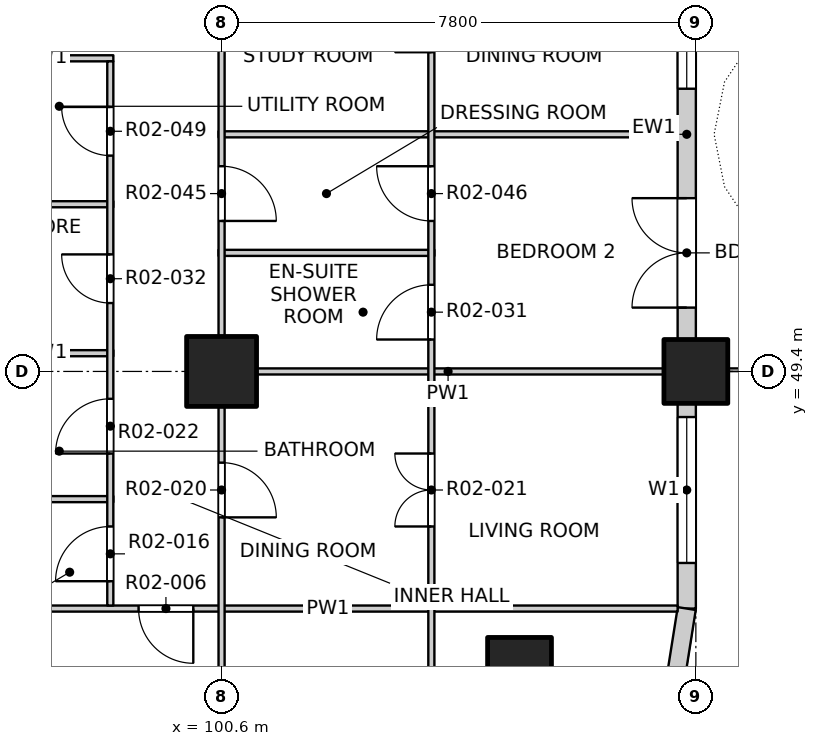
"""IFC4 building model, lengths in metres.
Left out: names, types, materials, properties, quantities, classifications, styles, units other than length and angle.
Written with IfcOpenShell. Run it as: python <this file> out.ifc"""

import sys

from ifc_helpers import new_model, si_unit, direction, frame, frame_2d, origin, origin_2d, place, context, subcontext, project, spatial, rectangle, extrude, element, fill, save


model = new_model("IFC4")
c1 = context("Model", 3, precision=1e-05, world=origin(), true_north=direction((0.0, 1.0)))
c2 = subcontext(c1, "Body", "Model", "MODEL_VIEW")
j1 = project(units=[si_unit("LENGTHUNIT", "METRE"), si_unit("PLANEANGLEUNIT", "RADIAN")], contexts=[c1])
p1 = place(None, origin())
s1 = spatial("IfcSite", under=j1, at=p1, CompositionType="ELEMENT")
p2 = place(p1, origin())
s2 = spatial("IfcBuilding", under=s1, at=p2, CompositionType="ELEMENT")
p3 = place(p2, frame((0.0, 0.0, 36.5)))
s3 = spatial("IfcBuildingStorey", under=s2, at=p3, CompositionType="ELEMENT", Elevation=36.5)
for number, where, z_axis, x_axis in (
    (1, (105.5, 44.5, -0.25), (0.0, 0.0, 1.0), (1.0, 0.0, 0.0)),
    (2, (108.4, 49.4, -0.25), (0.0, 0.0, 1.0), (1.0, 0.0, 0.0)),
):
    element("IfcColumn", number, at=place(p3, frame(where, z_axis=z_axis, x_axis=x_axis)), inside=s3, PredefinedType="COLUMN", context=c2, shape_type="SweptSolid", body=[
        extrude(rectangle(XDim=1.05, YDim=1.05, at=origin_2d()), origin(), (0.0, 0.0, 1.0), 3.4),
    ])
p4 = place(p3, frame((100.6, 49.4, -0.25), z_axis=(0.0, 0.0, 1.0), x_axis=(1.0, 0.0, 0.0)))
e3 = element("IfcColumn", 3, at=p4, inside=s3, PredefinedType="COLUMN", context=c2, shape_type="SweptSolid", body=[
    extrude(rectangle(XDim=1.15, YDim=1.15, at=origin_2d()), origin(), (0.0, 0.0, 1.0), 3.4),
])
p5 = place(p3, frame((108.25, 45.5, 0.0), z_axis=(0.0, 0.0, 1.0), x_axis=(0.0, 1.0, 0.0)))
e4 = element("IfcWall", 4, at=p5, inside=s3, PredefinedType="SOLIDWALL", context=c2, shape_type="SweptSolid", body=[
    extrude(rectangle(XDim=3.375, YDim=0.3, at=frame_2d((1.688, 0.0))), origin(), (0.0, 0.0, 1.0), 2.7),
])
p6 = place(p5, frame((0.75, 0.0, 0.9)))
e5 = element("IfcOpeningElement", 5, at=p6, cuts=e4, PredefinedType="OPENING", context=c2, shape_type="SweptSolid", body=[
    extrude(rectangle(XDim=2.4, YDim=1.8, at=frame_2d((1.2, 0.9))), frame((0.0, 0.16, 0.0), z_axis=(0.0, -1.0, 0.0), x_axis=(1.0, 0.0, 0.0)), (0.0, 0.0, 1.0), 0.32),
])
p7 = place(p3, frame((108.25, 49.925, 0.0), z_axis=(0.0, 0.0, 1.0), x_axis=(0.0, 1.0, 0.0)))
e6 = element("IfcWall", 6, at=p7, inside=s3, PredefinedType="SOLIDWALL", context=c2, shape_type="SweptSolid", body=[
    extrude(rectangle(XDim=6.75, YDim=0.3, at=frame_2d((3.375, 0.0))), origin(), (0.0, 0.0, 1.0), 2.7),
])
p8 = place(p7, frame((0.525, 0.0, 0.0)))
e7 = element("IfcOpeningElement", 7, at=p8, cuts=e6, PredefinedType="OPENING", context=c2, shape_type="SweptSolid", body=[
    extrude(rectangle(XDim=1.8, YDim=2.4, at=frame_2d((0.9, 1.2))), frame((0.0, 0.16, 0.0), z_axis=(0.0, -1.0, 0.0), x_axis=(1.0, 0.0, 0.0)), (0.0, 0.0, 1.0), 0.32),
])
p9 = place(p7, frame((4.125, 0.0, 0.9)))
e8 = element("IfcOpeningElement", 8, at=p9, cuts=e6, PredefinedType="OPENING", context=c2, shape_type="SweptSolid", body=[
    extrude(rectangle(XDim=2.4, YDim=1.8, at=frame_2d((1.2, 0.9))), frame((0.0, 0.16, 0.0), z_axis=(0.0, -1.0, 0.0), x_axis=(1.0, 0.0, 0.0)), (0.0, 0.0, 1.0), 0.32),
])
p10 = place(p3, frame((108.066, 44.341, 0.0), z_axis=(0.0, 0.0, 1.0), x_axis=(0.156496880861, 0.987678452879, 0.0)))
e9 = element("IfcWall", 9, at=p10, inside=s3, PredefinedType="SOLIDWALL", context=c2, shape_type="SweptSolid", body=[
    extrude(rectangle(XDim=1.173, YDim=0.3, at=frame_2d((0.586, 0.0))), origin(), (0.0, 0.0, 1.0), 2.7),
])
p11 = place(p3, frame((96.6, 45.5, 0.0), z_axis=(0.0, 0.0, 1.0), x_axis=(1.0, 0.0, 0.0)))
e10 = element("IfcWall", 10, at=p11, inside=s3, PredefinedType="PARTITIONING", context=c2, shape_type="SweptSolid", body=[
    extrude(rectangle(XDim=11.5, YDim=0.1, at=frame_2d((5.75, 0.0))), origin(), (0.0, 0.0, 1.0), 3.15),
])
p12 = place(p11, frame((2.635, 0.0, 0.0)))
e11 = element("IfcOpeningElement", 11, at=p12, cuts=e10, PredefinedType="OPENING", context=c2, shape_type="SweptSolid", body=[
    extrude(rectangle(XDim=0.9, YDim=2.1, at=frame_2d((0.45, 1.05))), frame((0.0, 0.06, 0.0), z_axis=(0.0, -1.0, 0.0), x_axis=(1.0, 0.0, 0.0)), (0.0, 0.0, 1.0), 0.12),
])
p13 = place(p3, frame((96.6, 47.3, 0.0), z_axis=(0.0, 0.0, 1.0), x_axis=(1.0, 0.0, 0.0)))
e12 = element("IfcWall", 12, at=p13, inside=s3, PredefinedType="PARTITIONING", context=c2, shape_type="SweptSolid", body=[
    extrude(rectangle(XDim=2.22, YDim=0.1, at=frame_2d((1.11, 0.0))), origin(), (0.0, 0.0, 1.0), 3.15),
])
p14 = place(p3, frame((100.55, 49.4, 0.0), z_axis=(0.0, 0.0, 1.0), x_axis=(1.0, 0.0, 0.0)))
e13 = element("IfcWall", 13, at=p14, inside=s3, PredefinedType="PARTITIONING", context=c2, shape_type="SweptSolid", body=[
    extrude(rectangle(XDim=7.55, YDim=0.1, at=frame_2d((3.775, 0.0))), origin(), (0.0, 0.0, 1.0), 3.15),
])
p15 = place(p3, frame((96.6, 49.7, 0.0), z_axis=(0.0, 0.0, 1.0), x_axis=(1.0, 0.0, 0.0)))
e14 = element("IfcWall", 14, at=p15, inside=s3, PredefinedType="PARTITIONING", context=c2, shape_type="SweptSolid", body=[
    extrude(rectangle(XDim=2.22, YDim=0.1, at=frame_2d((1.11, 0.0))), origin(), (0.0, 0.0, 1.0), 3.15),
])
p16 = place(p3, frame((100.55, 51.35, 0.0), z_axis=(0.0, 0.0, 1.0), x_axis=(1.0, 0.0, 0.0)))
e15 = element("IfcWall", 15, at=p16, inside=s3, PredefinedType="PARTITIONING", context=c2, shape_type="SweptSolid", body=[
    extrude(rectangle(XDim=3.55, YDim=0.1, at=frame_2d((1.775, 0.0))), origin(), (0.0, 0.0, 1.0), 3.15),
])
p17 = place(p3, frame((96.6, 52.15, 0.0), z_axis=(0.0, 0.0, 1.0), x_axis=(1.0, 0.0, 0.0)))
e16 = element("IfcWall", 16, at=p17, inside=s3, PredefinedType="PARTITIONING", context=c2, shape_type="SweptSolid", body=[
    extrude(rectangle(XDim=2.22, YDim=0.1, at=frame_2d((1.11, 0.0))), origin(), (0.0, 0.0, 1.0), 3.15),
])
p18 = place(p3, frame((100.55, 53.3, 0.0), z_axis=(0.0, 0.0, 1.0), x_axis=(1.0, 0.0, 0.0)))
e17 = element("IfcWall", 17, at=p18, inside=s3, PredefinedType="PARTITIONING", context=c2, shape_type="SweptSolid", body=[
    extrude(rectangle(XDim=7.55, YDim=0.1, at=frame_2d((3.775, 0.0))), origin(), (0.0, 0.0, 1.0), 3.15),
])
p19 = place(p3, frame((96.6, 54.55, 0.0), z_axis=(0.0, 0.0, 1.0), x_axis=(1.0, 0.0, 0.0)))
e18 = element("IfcWall", 18, at=p19, inside=s3, PredefinedType="PARTITIONING", context=c2, shape_type="SweptSolid", body=[
    extrude(rectangle(XDim=2.22, YDim=0.1, at=frame_2d((1.11, 0.0))), origin(), (0.0, 0.0, 1.0), 3.15),
])
p20 = place(p3, frame((98.77, 45.55, 0.0), z_axis=(0.0, 0.0, 1.0), x_axis=(0.0, 1.0, 0.0)))
e19 = element("IfcWall", 19, at=p20, inside=s3, PredefinedType="PARTITIONING", context=c2, shape_type="SweptSolid", body=[
    extrude(rectangle(XDim=8.95, YDim=0.1, at=frame_2d((4.475, 0.0))), origin(), (0.0, 0.0, 1.0), 3.15),
])
p21 = place(p20, frame((0.4, 0.0, 0.0)))
e20 = element("IfcOpeningElement", 20, at=p21, cuts=e19, PredefinedType="OPENING", context=c2, shape_type="SweptSolid", body=[
    extrude(rectangle(XDim=0.9, YDim=2.1, at=frame_2d((0.45, 1.05))), frame((0.0, 0.06, 0.0), z_axis=(0.0, -1.0, 0.0), x_axis=(1.0, 0.0, 0.0)), (0.0, 0.0, 1.0), 0.12),
])
p22 = place(p20, frame((2.5, 0.0, 0.0)))
e21 = element("IfcOpeningElement", 21, at=p22, cuts=e19, PredefinedType="OPENING", context=c2, shape_type="SweptSolid", body=[
    extrude(rectangle(XDim=0.9, YDim=2.1, at=frame_2d((0.45, 1.05))), frame((0.0, 0.06, 0.0), z_axis=(0.0, -1.0, 0.0), x_axis=(1.0, 0.0, 0.0)), (0.0, 0.0, 1.0), 0.12),
])
p23 = place(p20, frame((4.975, 0.0, 0.0)))
e22 = element("IfcOpeningElement", 22, at=p23, cuts=e19, PredefinedType="OPENING", context=c2, shape_type="SweptSolid", body=[
    extrude(rectangle(XDim=0.8, YDim=2.1, at=frame_2d((0.4, 1.05))), frame((0.0, 0.06, 0.0), z_axis=(0.0, -1.0, 0.0), x_axis=(1.0, 0.0, 0.0)), (0.0, 0.0, 1.0), 0.12),
])
p24 = place(p20, frame((7.4, 0.0, 0.0)))
e23 = element("IfcOpeningElement", 23, at=p24, cuts=e19, PredefinedType="OPENING", context=c2, shape_type="SweptSolid", body=[
    extrude(rectangle(XDim=0.8, YDim=2.1, at=frame_2d((0.4, 1.05))), frame((0.0, 0.06, 0.0), z_axis=(0.0, -1.0, 0.0), x_axis=(1.0, 0.0, 0.0)), (0.0, 0.0, 1.0), 0.12),
])
p25 = place(p3, frame((100.6, 41.9, 0.0), z_axis=(0.0, 0.0, 1.0), x_axis=(0.0, 1.0, 0.0)))
e24 = element("IfcWall", 24, at=p25, inside=s3, PredefinedType="PARTITIONING", context=c2, shape_type="SweptSolid", body=[
    extrude(rectangle(XDim=7.5, YDim=0.1, at=frame_2d((3.75, 0.0))), origin(), (0.0, 0.0, 1.0), 2.55),
])
p26 = place(p25, frame((1.2, 0.0, 0.0)))
e25 = element("IfcOpeningElement", 25, at=p26, cuts=e24, PredefinedType="OPENING", context=c2, shape_type="SweptSolid", body=[
    extrude(rectangle(XDim=0.9, YDim=2.1, at=frame_2d((0.45, 1.05))), frame((0.0, 0.06, 0.0), z_axis=(0.0, -1.0, 0.0), x_axis=(1.0, 0.0, 0.0)), (0.0, 0.0, 1.0), 0.12),
])
p27 = place(p25, frame((5.1, 0.0, 0.0)))
e26 = element("IfcOpeningElement", 26, at=p27, cuts=e24, PredefinedType="OPENING", context=c2, shape_type="SweptSolid", body=[
    extrude(rectangle(XDim=0.9, YDim=2.1, at=frame_2d((0.45, 1.05))), frame((0.0, 0.06, 0.0), z_axis=(0.0, -1.0, 0.0), x_axis=(1.0, 0.0, 0.0)), (0.0, 0.0, 1.0), 0.12),
])
p28 = place(p3, frame((100.6, 49.4, 0.0), z_axis=(0.0, 0.0, 1.0), x_axis=(0.0, 1.0, 0.0)))
e27 = element("IfcWall", 27, at=p28, inside=s3, PredefinedType="PARTITIONING", context=c2, shape_type="SweptSolid", body=[
    extrude(rectangle(XDim=31.2, YDim=0.1, at=frame_2d((15.6, 0.0))), origin(), (0.0, 0.0, 1.0), 3.15),
])
p29 = place(p28, frame((2.475, 0.0, 0.0)))
e28 = element("IfcOpeningElement", 28, at=p29, cuts=e27, PredefinedType="OPENING", context=c2, shape_type="SweptSolid", body=[
    extrude(rectangle(XDim=0.9, YDim=2.1, at=frame_2d((0.45, 1.05))), frame((0.0, 0.06, 0.0), z_axis=(0.0, -1.0, 0.0), x_axis=(1.0, 0.0, 0.0)), (0.0, 0.0, 1.0), 0.12),
])
p30 = place(p28, frame((5.4, 0.0, 0.0)))
e29 = element("IfcOpeningElement", 29, at=p30, cuts=e27, PredefinedType="OPENING", context=c2, shape_type="SweptSolid", body=[
    extrude(rectangle(XDim=0.9, YDim=2.1, at=frame_2d((0.45, 1.05))), frame((0.0, 0.06, 0.0), z_axis=(0.0, -1.0, 0.0), x_axis=(1.0, 0.0, 0.0)), (0.0, 0.0, 1.0), 0.12),
])
p31 = place(p28, frame((10.275, 0.0, 0.0)))
e30 = element("IfcOpeningElement", 30, at=p31, cuts=e27, PredefinedType="OPENING", context=c2, shape_type="SweptSolid", body=[
    extrude(rectangle(XDim=0.9, YDim=2.1, at=frame_2d((0.45, 1.05))), frame((0.0, 0.06, 0.0), z_axis=(0.0, -1.0, 0.0), x_axis=(1.0, 0.0, 0.0)), (0.0, 0.0, 1.0), 0.12),
])
p32 = place(p28, frame((14.0, 0.0, 0.0)))
e31 = element("IfcOpeningElement", 31, at=p32, cuts=e27, PredefinedType="OPENING", context=c2, shape_type="SweptSolid", body=[
    extrude(rectangle(XDim=0.9, YDim=2.1, at=frame_2d((0.45, 1.05))), frame((0.0, 0.06, 0.0), z_axis=(0.0, -1.0, 0.0), x_axis=(1.0, 0.0, 0.0)), (0.0, 0.0, 1.0), 0.12),
])
p33 = place(p28, frame((17.1, 0.0, 0.0)))
e32 = element("IfcOpeningElement", 32, at=p33, cuts=e27, PredefinedType="OPENING", context=c2, shape_type="SweptSolid", body=[
    extrude(rectangle(XDim=0.9, YDim=2.1, at=frame_2d((0.45, 1.05))), frame((0.0, 0.06, 0.0), z_axis=(0.0, -1.0, 0.0), x_axis=(1.0, 0.0, 0.0)), (0.0, 0.0, 1.0), 0.12),
])
p34 = place(p28, frame((21.0, 0.0, 0.0)))
e33 = element("IfcOpeningElement", 33, at=p34, cuts=e27, PredefinedType="OPENING", context=c2, shape_type="SweptSolid", body=[
    extrude(rectangle(XDim=0.9, YDim=2.1, at=frame_2d((0.45, 1.05))), frame((0.0, 0.06, 0.0), z_axis=(0.0, -1.0, 0.0), x_axis=(1.0, 0.0, 0.0)), (0.0, 0.0, 1.0), 0.12),
])
p35 = place(p28, frame((25.875, 0.0, 0.0)))
e34 = element("IfcOpeningElement", 34, at=p35, cuts=e27, PredefinedType="OPENING", context=c2, shape_type="SweptSolid", body=[
    extrude(rectangle(XDim=0.9, YDim=2.1, at=frame_2d((0.45, 1.05))), frame((0.0, 0.06, 0.0), z_axis=(0.0, -1.0, 0.0), x_axis=(1.0, 0.0, 0.0)), (0.0, 0.0, 1.0), 0.12),
])
p36 = place(p28, frame((29.6, 0.0, 0.0)))
e35 = element("IfcOpeningElement", 35, at=p36, cuts=e27, PredefinedType="OPENING", context=c2, shape_type="SweptSolid", body=[
    extrude(rectangle(XDim=0.9, YDim=2.1, at=frame_2d((0.45, 1.05))), frame((0.0, 0.06, 0.0), z_axis=(0.0, -1.0, 0.0), x_axis=(1.0, 0.0, 0.0)), (0.0, 0.0, 1.0), 0.12),
])
p37 = place(p3, frame((104.05, 41.9, 0.0), z_axis=(0.0, 0.0, 1.0), x_axis=(0.0, 1.0, 0.0)))
e36 = element("IfcWall", 36, at=p37, inside=s3, PredefinedType="PARTITIONING", context=c2, shape_type="SweptSolid", body=[
    extrude(rectangle(XDim=19.1, YDim=0.1, at=frame_2d((9.55, 0.0))), origin(), (0.0, 0.0, 1.0), 3.15),
])
p38 = place(p37, frame((1.05, 0.0, 0.0)))
e37 = element("IfcOpeningElement", 37, at=p38, cuts=e36, PredefinedType="OPENING", context=c2, shape_type="SweptSolid", body=[
    extrude(rectangle(XDim=1.2, YDim=2.1, at=frame_2d((0.6, 1.05))), frame((0.0, 0.06, 0.0), z_axis=(0.0, -1.0, 0.0), x_axis=(1.0, 0.0, 0.0)), (0.0, 0.0, 1.0), 0.12),
])
p39 = place(p37, frame((4.95, 0.0, 0.0)))
e38 = element("IfcOpeningElement", 38, at=p39, cuts=e36, PredefinedType="OPENING", context=c2, shape_type="SweptSolid", body=[
    extrude(rectangle(XDim=1.2, YDim=2.1, at=frame_2d((0.6, 1.05))), frame((0.0, 0.06, 0.0), z_axis=(0.0, -1.0, 0.0), x_axis=(1.0, 0.0, 0.0)), (0.0, 0.0, 1.0), 0.12),
])
p40 = place(p37, frame((8.025, 0.0, 0.0)))
e39 = element("IfcOpeningElement", 39, at=p40, cuts=e36, PredefinedType="OPENING", context=c2, shape_type="SweptSolid", body=[
    extrude(rectangle(XDim=0.9, YDim=2.1, at=frame_2d((0.45, 1.05))), frame((0.0, 0.06, 0.0), z_axis=(0.0, -1.0, 0.0), x_axis=(1.0, 0.0, 0.0)), (0.0, 0.0, 1.0), 0.12),
])
p41 = place(p37, frame((9.975, 0.0, 0.0)))
e40 = element("IfcOpeningElement", 40, at=p41, cuts=e36, PredefinedType="OPENING", context=c2, shape_type="SweptSolid", body=[
    extrude(rectangle(XDim=0.9, YDim=2.1, at=frame_2d((0.45, 1.05))), frame((0.0, 0.06, 0.0), z_axis=(0.0, -1.0, 0.0), x_axis=(1.0, 0.0, 0.0)), (0.0, 0.0, 1.0), 0.12),
])
p42 = place(p37, frame((12.75, 0.0, 0.0)))
e41 = element("IfcOpeningElement", 41, at=p42, cuts=e36, PredefinedType="OPENING", context=c2, shape_type="SweptSolid", body=[
    extrude(rectangle(XDim=1.2, YDim=2.1, at=frame_2d((0.6, 1.05))), frame((0.0, 0.06, 0.0), z_axis=(0.0, -1.0, 0.0), x_axis=(1.0, 0.0, 0.0)), (0.0, 0.0, 1.0), 0.12),
])
p43 = place(p37, frame((15.825, 0.0, 0.0)))
e42 = element("IfcOpeningElement", 42, at=p43, cuts=e36, PredefinedType="OPENING", context=c2, shape_type="SweptSolid", body=[
    extrude(rectangle(XDim=0.9, YDim=2.1, at=frame_2d((0.45, 1.05))), frame((0.0, 0.06, 0.0), z_axis=(0.0, -1.0, 0.0), x_axis=(1.0, 0.0, 0.0)), (0.0, 0.0, 1.0), 0.12),
])
p44 = place(p37, frame((17.775, 0.0, 0.0)))
e43 = element("IfcOpeningElement", 43, at=p44, cuts=e36, PredefinedType="OPENING", context=c2, shape_type="SweptSolid", body=[
    extrude(rectangle(XDim=0.9, YDim=2.1, at=frame_2d((0.45, 1.05))), frame((0.0, 0.06, 0.0), z_axis=(0.0, -1.0, 0.0), x_axis=(1.0, 0.0, 0.0)), (0.0, 0.0, 1.0), 0.12),
])
p45 = place(p6, origin())
e44 = element("IfcWindow", 44, at=p45, inside=s3, PartitioningType="DOUBLE_PANEL_VERTICAL", PredefinedType="WINDOW", context=c2, shape_type="SweptSolid", body=[
    extrude(rectangle(XDim=2.4, YDim=1.8, at=frame_2d((1.2, 0.9))), frame((0.0, 0.03, 0.0), z_axis=(0.0, -1.0, 0.0), x_axis=(1.0, 0.0, 0.0)), (0.0, 0.0, 1.0), 0.06),
])
fill(e5, e44)
p46 = place(p8, origin())
e45 = element("IfcDoor", 45, at=p46, inside=s3, OperationType="DOUBLE_DOOR_SINGLE_SWING", PredefinedType="DOOR", context=c2, shape_type="SweptSolid", body=[
    extrude(rectangle(XDim=1.8, YDim=2.4, at=frame_2d((0.9, 1.2))), frame((0.0, 0.025, 0.0), z_axis=(0.0, -1.0, 0.0), x_axis=(1.0, 0.0, 0.0)), (0.0, 0.0, 1.0), 0.05),
])
fill(e7, e45)
p47 = place(p9, origin())
e46 = element("IfcWindow", 46, at=p47, inside=s3, PartitioningType="DOUBLE_PANEL_VERTICAL", PredefinedType="WINDOW", context=c2, shape_type="SweptSolid", body=[
    extrude(rectangle(XDim=2.4, YDim=1.8, at=frame_2d((1.2, 0.9))), frame((0.0, 0.03, 0.0), z_axis=(0.0, -1.0, 0.0), x_axis=(1.0, 0.0, 0.0)), (0.0, 0.0, 1.0), 0.06),
])
fill(e8, e46)
p48 = place(p12, origin())
e47 = element("IfcDoor", 47, at=p48, inside=s3, OperationType="SINGLE_SWING_LEFT", PredefinedType="DOOR", context=c2, shape_type="SweptSolid", body=[
    extrude(rectangle(XDim=0.9, YDim=2.1, at=frame_2d((0.45, 1.05))), frame((0.0, 0.025, 0.0), z_axis=(0.0, -1.0, 0.0), x_axis=(1.0, 0.0, 0.0)), (0.0, 0.0, 1.0), 0.05),
])
fill(e11, e47)
p49 = place(p21, origin())
e48 = element("IfcDoor", 48, at=p49, inside=s3, OperationType="SINGLE_SWING_LEFT", PredefinedType="DOOR", context=c2, shape_type="SweptSolid", body=[
    extrude(rectangle(XDim=0.9, YDim=2.1, at=frame_2d((0.45, 1.05))), frame((0.0, 0.025, 0.0), z_axis=(0.0, -1.0, 0.0), x_axis=(1.0, 0.0, 0.0)), (0.0, 0.0, 1.0), 0.05),
])
fill(e20, e48)
p50 = place(p27, origin())
e49 = element("IfcDoor", 49, at=p50, inside=s3, OperationType="SINGLE_SWING_RIGHT", PredefinedType="DOOR", context=c2, shape_type="SweptSolid", body=[
    extrude(rectangle(XDim=0.9, YDim=2.1, at=frame_2d((0.45, 1.05))), frame((0.0, 0.025, 0.0), z_axis=(0.0, -1.0, 0.0), x_axis=(1.0, 0.0, 0.0)), (0.0, 0.0, 1.0), 0.05),
])
fill(e26, e49)
p51 = place(p39, origin())
e50 = element("IfcDoor", 50, at=p51, inside=s3, OperationType="DOUBLE_DOOR_SINGLE_SWING", PredefinedType="DOOR", context=c2, shape_type="SweptSolid", body=[
    extrude(rectangle(XDim=1.2, YDim=2.1, at=frame_2d((0.6, 1.05))), frame((0.0, 0.025, 0.0), z_axis=(0.0, -1.0, 0.0), x_axis=(1.0, 0.0, 0.0)), (0.0, 0.0, 1.0), 0.05),
])
fill(e38, e50)
p52 = place(p22, origin())
e51 = element("IfcDoor", 51, at=p52, inside=s3, OperationType="SINGLE_SWING_LEFT", PredefinedType="DOOR", context=c2, shape_type="SweptSolid", body=[
    extrude(rectangle(XDim=0.9, YDim=2.1, at=frame_2d((0.45, 1.05))), frame((0.0, 0.025, 0.0), z_axis=(0.0, -1.0, 0.0), x_axis=(1.0, 0.0, 0.0)), (0.0, 0.0, 1.0), 0.05),
])
fill(e21, e51)
p53 = place(p40, origin())
e52 = element("IfcDoor", 52, at=p53, inside=s3, OperationType="SINGLE_SWING_LEFT", PredefinedType="DOOR", context=c2, shape_type="SweptSolid", body=[
    extrude(rectangle(XDim=0.9, YDim=2.1, at=frame_2d((0.45, 1.05))), frame((0.0, 0.025, 0.0), z_axis=(0.0, -1.0, 0.0), x_axis=(1.0, 0.0, 0.0)), (0.0, 0.0, 1.0), 0.05),
])
fill(e39, e52)
p54 = place(p23, origin())
e53 = element("IfcDoor", 53, at=p54, inside=s3, OperationType="SINGLE_SWING_RIGHT", PredefinedType="DOOR", context=c2, shape_type="SweptSolid", body=[
    extrude(rectangle(XDim=0.8, YDim=2.1, at=frame_2d((0.4, 1.05))), frame((0.0, 0.025, 0.0), z_axis=(0.0, -1.0, 0.0), x_axis=(1.0, 0.0, 0.0)), (0.0, 0.0, 1.0), 0.05),
])
fill(e22, e53)
p55 = place(p29, origin())
e54 = element("IfcDoor", 54, at=p55, inside=s3, OperationType="SINGLE_SWING_RIGHT", PredefinedType="DOOR", context=c2, shape_type="SweptSolid", body=[
    extrude(rectangle(XDim=0.9, YDim=2.1, at=frame_2d((0.45, 1.05))), frame((0.0, 0.025, 0.0), z_axis=(0.0, -1.0, 0.0), x_axis=(1.0, 0.0, 0.0)), (0.0, 0.0, 1.0), 0.05),
])
fill(e28, e54)
p56 = place(p41, origin())
e55 = element("IfcDoor", 55, at=p56, inside=s3, OperationType="SINGLE_SWING_RIGHT", PredefinedType="DOOR", context=c2, shape_type="SweptSolid", body=[
    extrude(rectangle(XDim=0.9, YDim=2.1, at=frame_2d((0.45, 1.05))), frame((0.0, 0.025, 0.0), z_axis=(0.0, -1.0, 0.0), x_axis=(1.0, 0.0, 0.0)), (0.0, 0.0, 1.0), 0.05),
])
fill(e40, e55)
p57 = place(p24, origin())
e56 = element("IfcDoor", 56, at=p57, inside=s3, OperationType="SINGLE_SWING_RIGHT", PredefinedType="DOOR", context=c2, shape_type="SweptSolid", body=[
    extrude(rectangle(XDim=0.8, YDim=2.1, at=frame_2d((0.4, 1.05))), frame((0.0, 0.025, 0.0), z_axis=(0.0, -1.0, 0.0), x_axis=(1.0, 0.0, 0.0)), (0.0, 0.0, 1.0), 0.05),
])
fill(e23, e56)
save(model, sys.argv[1])
